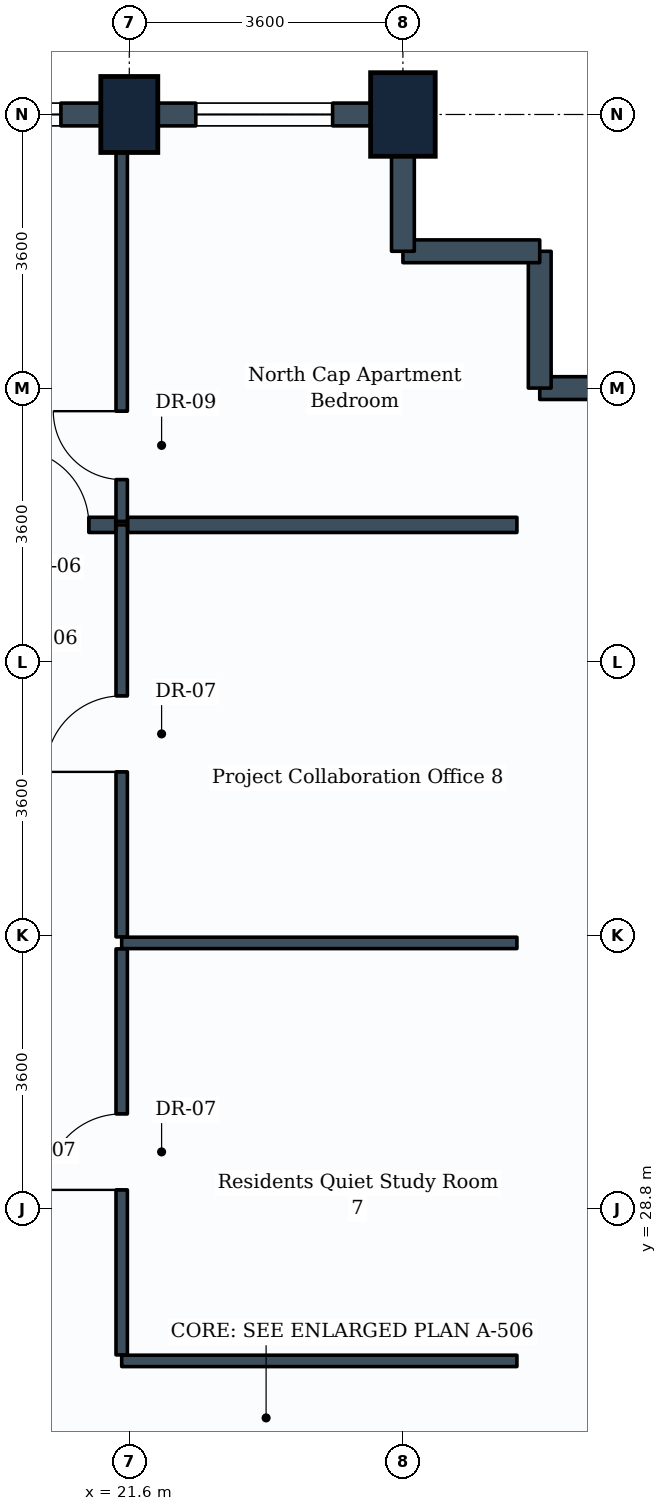
"""IFC4 building model, lengths in metres.
Left out: names, types, materials, properties, quantities, classifications, styles, units other than length and angle.
Written with IfcOpenShell. Run it as: python <this file> out.ifc"""

import sys

from ifc_helpers import new_model, si_unit, direction, frame, frame_2d, origin, origin_2d, place, context, subcontext, project, spatial, rectangle, extrude, element, fill, save


model = new_model("IFC4")
c1 = context("Model", 3, precision=1e-05, world=origin(), true_north=direction((0.0, 1.0)))
c2 = subcontext(c1, "Body", "Model", "MODEL_VIEW")
j1 = project(units=[si_unit("LENGTHUNIT", "METRE"), si_unit("PLANEANGLEUNIT", "RADIAN")], contexts=[c1])
p1 = place(None, origin())
s1 = spatial("IfcSite", under=j1, at=p1, CompositionType="ELEMENT")
p2 = place(p1, origin())
s2 = spatial("IfcBuilding", under=s1, at=p2, CompositionType="ELEMENT")
p3 = place(p2, frame((0.0, 0.0, 150.4)))
s3 = spatial("IfcBuildingStorey", under=s2, at=p3, CompositionType="ELEMENT", Elevation=150.4)
p4 = place(p3, frame((21.6, 43.2, 0.0), z_axis=(0.0, 0.0, 1.0), x_axis=(1.0, 0.0, 0.0)))
e1 = element("IfcColumn", 1, at=p4, inside=s3, PredefinedType="COLUMN", context=c2, shape_type="SweptSolid", body=[
    extrude(rectangle(XDim=0.75, YDim=1.0, at=origin_2d()), origin(), (0.0, 0.0, 1.0), 3.8),
])
p5 = place(p3, frame((25.2, 43.2, 0.0), z_axis=(0.0, 0.0, 1.0), x_axis=(1.0, 0.0, 0.0)))
e2 = element("IfcColumn", 2, at=p5, inside=s3, PredefinedType="COLUMN", context=c2, shape_type="SweptSolid", body=[
    extrude(rectangle(XDim=0.85, YDim=1.1, at=origin_2d()), origin(), (0.0, 0.0, 1.0), 3.8),
])
p6 = place(p3, frame((27.0, 39.6, 0.0), z_axis=(0.0, 0.0, 1.0), x_axis=(1.0, 0.0, 0.0)))
e3 = element("IfcWall", 3, at=p6, inside=s3, PredefinedType="STANDARD", context=c2, shape_type="SweptSolid", body=[
    extrude(rectangle(XDim=1.8, YDim=0.3, at=frame_2d((0.9, 0.0))), origin(), (0.0, 0.0, 1.0), 2.93),
])
p7 = place(p3, frame((27.0, 39.6, 0.0), z_axis=(0.0, 0.0, 1.0), x_axis=(0.0, 1.0, 0.0)))
e4 = element("IfcWall", 4, at=p7, inside=s3, PredefinedType="STANDARD", context=c2, shape_type="SweptSolid", body=[
    extrude(rectangle(XDim=1.8, YDim=0.3, at=frame_2d((0.9, 0.0))), origin(), (0.0, 0.0, 1.0), 3.535),
])
p8 = place(p3, frame((25.2, 41.4, 0.0), z_axis=(0.0, 0.0, 1.0), x_axis=(1.0, 0.0, 0.0)))
e5 = element("IfcWall", 5, at=p8, inside=s3, PredefinedType="STANDARD", context=c2, shape_type="SweptSolid", body=[
    extrude(rectangle(XDim=1.8, YDim=0.3, at=frame_2d((0.9, 0.0))), origin(), (0.0, 0.0, 1.0), 3.535),
])
p9 = place(p3, frame((25.2, 41.4, 0.0), z_axis=(0.0, 0.0, 1.0), x_axis=(0.0, 1.0, 0.0)))
e6 = element("IfcWall", 6, at=p9, inside=s3, PredefinedType="STANDARD", context=c2, shape_type="SweptSolid", body=[
    extrude(rectangle(XDim=1.8, YDim=0.3, at=frame_2d((0.9, 0.0))), origin(), (0.0, 0.0, 1.0), 2.93),
])
p10 = place(p3, frame((21.6, 43.2, 0.0), z_axis=(0.0, 0.0, 1.0), x_axis=(1.0, 0.0, 0.0)))
e7 = element("IfcWall", 7, at=p10, inside=s3, PredefinedType="STANDARD", context=c2, shape_type="SweptSolid", body=[
    extrude(rectangle(XDim=3.6, YDim=0.3, at=frame_2d((1.8, 0.0))), origin(), (0.0, 0.0, 1.0), 2.93),
])
p11 = place(p10, frame((0.875, 0.0, 0.85)))
e8 = element("IfcOpeningElement", 8, at=p11, cuts=e7, PredefinedType="OPENING", context=c2, shape_type="SweptSolid", body=[
    extrude(rectangle(XDim=1.8, YDim=1.35, at=frame_2d((0.9, 0.675))), frame((0.0, 0.16, 0.0), z_axis=(0.0, -1.0, 0.0), x_axis=(1.0, 0.0, 0.0)), (0.0, 0.0, 1.0), 0.32),
])
p12 = place(p3, frame((18.0, 43.2, 0.0), z_axis=(0.0, 0.0, 1.0), x_axis=(1.0, 0.0, 0.0)))
e9 = element("IfcWall", 9, at=p12, inside=s3, PredefinedType="STANDARD", context=c2, shape_type="SweptSolid", body=[
    extrude(rectangle(XDim=3.6, YDim=0.3, at=frame_2d((1.8, 0.0))), origin(), (0.0, 0.0, 1.0), 2.93),
])
p13 = place(p12, frame((0.9, 0.0, 0.85)))
e10 = element("IfcOpeningElement", 10, at=p13, cuts=e9, PredefinedType="OPENING", context=c2, shape_type="SweptSolid", body=[
    extrude(rectangle(XDim=1.8, YDim=1.35, at=frame_2d((0.9, 0.675))), frame((0.0, 0.16, 0.0), z_axis=(0.0, -1.0, 0.0), x_axis=(1.0, 0.0, 0.0)), (0.0, 0.0, 1.0), 0.32),
])
p14 = place(p3, frame((21.5, 26.8, 0.0), z_axis=(0.0, 0.0, 1.0), x_axis=(1.0, 0.0, 0.0)))
e11 = element("IfcWall", 11, at=p14, inside=s3, PredefinedType="PARTITIONING", context=c2, shape_type="SweptSolid", body=[
    extrude(rectangle(XDim=5.2, YDim=0.15, at=frame_2d((2.6, 0.0))), origin(), (0.0, 0.0, 1.0), 3.535),
])
p15 = place(p3, frame((21.5, 32.3, 0.0), z_axis=(0.0, 0.0, 1.0), x_axis=(1.0, 0.0, 0.0)))
e12 = element("IfcWall", 12, at=p15, inside=s3, PredefinedType="PARTITIONING", context=c2, shape_type="SweptSolid", body=[
    extrude(rectangle(XDim=5.2, YDim=0.15, at=frame_2d((2.6, 0.0))), origin(), (0.0, 0.0, 1.0), 3.18),
])
p16 = place(p3, frame((21.5, 26.879, 0.0), z_axis=(0.0, 0.0, 1.0), x_axis=(0.0, 1.0, 0.0)))
e13 = element("IfcWall", 13, at=p16, inside=s3, PredefinedType="PARTITIONING", context=c2, shape_type="SweptSolid", body=[
    extrude(rectangle(XDim=5.342, YDim=0.15, at=frame_2d((2.671, 0.0))), origin(), (0.0, 0.0, 1.0), 3.17),
])
p17 = place(p16, frame((2.171, 0.0, 0.0)))
e14 = element("IfcOpeningElement", 14, at=p17, cuts=e13, PredefinedType="OPENING", context=c2, shape_type="SweptSolid", body=[
    extrude(rectangle(XDim=1.0, YDim=2.1, at=frame_2d((0.5, 1.05))), frame((0.0, 0.085, 0.0), z_axis=(0.0, -1.0, 0.0), x_axis=(1.0, 0.0, 0.0)), (0.0, 0.0, 1.0), 0.17),
])
p18 = place(p3, frame((21.5, 32.379, 0.0), z_axis=(0.0, 0.0, 1.0), x_axis=(0.0, 1.0, 0.0)))
e15 = element("IfcWall", 15, at=p18, inside=s3, PredefinedType="PARTITIONING", context=c2, shape_type="SweptSolid", body=[
    extrude(rectangle(XDim=5.421, YDim=0.15, at=frame_2d((2.71, 0.0))), origin(), (0.0, 0.0, 1.0), 3.17),
])
p19 = place(p18, frame((2.171, 0.0, 0.0)))
e16 = element("IfcOpeningElement", 16, at=p19, cuts=e15, PredefinedType="OPENING", context=c2, shape_type="SweptSolid", body=[
    extrude(rectangle(XDim=1.0, YDim=2.1, at=frame_2d((0.5, 1.05))), frame((0.0, 0.085, 0.0), z_axis=(0.0, -1.0, 0.0), x_axis=(1.0, 0.0, 0.0)), (0.0, 0.0, 1.0), 0.17),
])
p20 = place(p3, frame((21.579, 37.8, 0.0), z_axis=(0.0, 0.0, 1.0), x_axis=(1.0, 0.0, 0.0)))
e17 = element("IfcWall", 17, at=p20, inside=s3, PredefinedType="PARTITIONING", context=c2, shape_type="SweptSolid", body=[
    extrude(rectangle(XDim=5.121, YDim=0.2, at=frame_2d((2.561, 0.0))), origin(), (0.0, 0.0, 1.0), 3.535),
])
p21 = place(p3, frame((19.754, 37.8, 0.0), z_axis=(0.0, 0.0, 1.0), x_axis=(1.0, 0.0, 0.0)))
e18 = element("IfcWall", 18, at=p21, inside=s3, PredefinedType="PARTITIONING", context=c2, shape_type="SweptSolid", body=[
    extrude(rectangle(XDim=1.667, YDim=0.2, at=frame_2d((0.833, 0.0))), origin(), (0.0, 0.0, 1.0), 3.535),
])
p22 = place(p21, frame((0.314, 0.0, 0.0)))
e19 = element("IfcOpeningElement", 19, at=p22, cuts=e18, PredefinedType="OPENING", context=c2, shape_type="SweptSolid", body=[
    extrude(rectangle(XDim=1.0, YDim=2.1, at=frame_2d((0.5, 1.05))), frame((0.0, 0.11, 0.0), z_axis=(0.0, -1.0, 0.0), x_axis=(1.0, 0.0, 0.0)), (0.0, 0.0, 1.0), 0.22),
])
p23 = place(p3, frame((21.5, 37.846, 0.0), z_axis=(0.0, 0.0, 1.0), x_axis=(0.0, 1.0, 0.0)))
e20 = element("IfcWall", 20, at=p23, inside=s3, PredefinedType="PARTITIONING", context=c2, shape_type="SweptSolid", body=[
    extrude(rectangle(XDim=5.2, YDim=0.15, at=frame_2d((2.6, 0.0))), origin(), (0.0, 0.0, 1.0), 2.93),
])
p24 = place(p23, frame((0.55, 0.0, 0.0)))
e21 = element("IfcOpeningElement", 21, at=p24, cuts=e20, PredefinedType="OPENING", context=c2, shape_type="SweptSolid", body=[
    extrude(rectangle(XDim=0.9, YDim=2.1, at=frame_2d((0.45, 1.05))), frame((0.0, 0.085, 0.0), z_axis=(0.0, -1.0, 0.0), x_axis=(1.0, 0.0, 0.0)), (0.0, 0.0, 1.0), 0.17),
])
p25 = place(p11, origin())
e22 = element("IfcWindow", 22, at=p25, inside=s3, PartitioningType="SINGLE_PANEL", PredefinedType="WINDOW", context=c2, shape_type="SweptSolid", body=[
    extrude(rectangle(XDim=1.8, YDim=1.35, at=frame_2d((0.9, 0.675))), frame((0.0, 0.03, 0.0), z_axis=(0.0, -1.0, 0.0), x_axis=(1.0, 0.0, 0.0)), (0.0, 0.0, 1.0), 0.06),
])
fill(e8, e22)
p26 = place(p13, origin())
e23 = element("IfcWindow", 23, at=p26, inside=s3, PartitioningType="SINGLE_PANEL", PredefinedType="WINDOW", context=c2, shape_type="SweptSolid", body=[
    extrude(rectangle(XDim=1.8, YDim=1.35, at=frame_2d((0.9, 0.675))), frame((0.0, 0.03, 0.0), z_axis=(0.0, -1.0, 0.0), x_axis=(1.0, 0.0, 0.0)), (0.0, 0.0, 1.0), 0.06),
])
fill(e10, e23)
p27 = place(p17, origin())
e24 = element("IfcDoor", 24, at=p27, inside=s3, OperationType="SINGLE_SWING_LEFT", PredefinedType="DOOR", context=c2, shape_type="SweptSolid", body=[
    extrude(rectangle(XDim=1.0, YDim=2.1, at=frame_2d((0.5, 1.05))), frame((0.0, 0.025, 0.0), z_axis=(0.0, -1.0, 0.0), x_axis=(1.0, 0.0, 0.0)), (0.0, 0.0, 1.0), 0.05),
])
fill(e14, e24)
p28 = place(p19, origin())
e25 = element("IfcDoor", 25, at=p28, inside=s3, OperationType="SINGLE_SWING_LEFT", PredefinedType="DOOR", context=c2, shape_type="SweptSolid", body=[
    extrude(rectangle(XDim=1.0, YDim=2.1, at=frame_2d((0.5, 1.05))), frame((0.0, 0.025, 0.0), z_axis=(0.0, -1.0, 0.0), x_axis=(1.0, 0.0, 0.0)), (0.0, 0.0, 1.0), 0.05),
])
fill(e16, e25)
p29 = place(p22, origin())
e26 = element("IfcDoor", 26, at=p29, inside=s3, OperationType="SINGLE_SWING_LEFT", PredefinedType="DOOR", context=c2, shape_type="SweptSolid", body=[
    extrude(rectangle(XDim=1.0, YDim=2.1, at=frame_2d((0.5, 1.05))), frame((0.0, 0.025, 0.0), z_axis=(0.0, -1.0, 0.0), x_axis=(1.0, 0.0, 0.0)), (0.0, 0.0, 1.0), 0.05),
])
fill(e19, e26)
p30 = place(p24, origin())
e27 = element("IfcDoor", 27, at=p30, inside=s3, OperationType="SINGLE_SWING_RIGHT", PredefinedType="DOOR", context=c2, shape_type="SweptSolid", body=[
    extrude(rectangle(XDim=0.9, YDim=2.1, at=frame_2d((0.45, 1.05))), frame((0.0, 0.025, 0.0), z_axis=(0.0, -1.0, 0.0), x_axis=(1.0, 0.0, 0.0)), (0.0, 0.0, 1.0), 0.05),
])
fill(e21, e27)
save(model, sys.argv[1])
